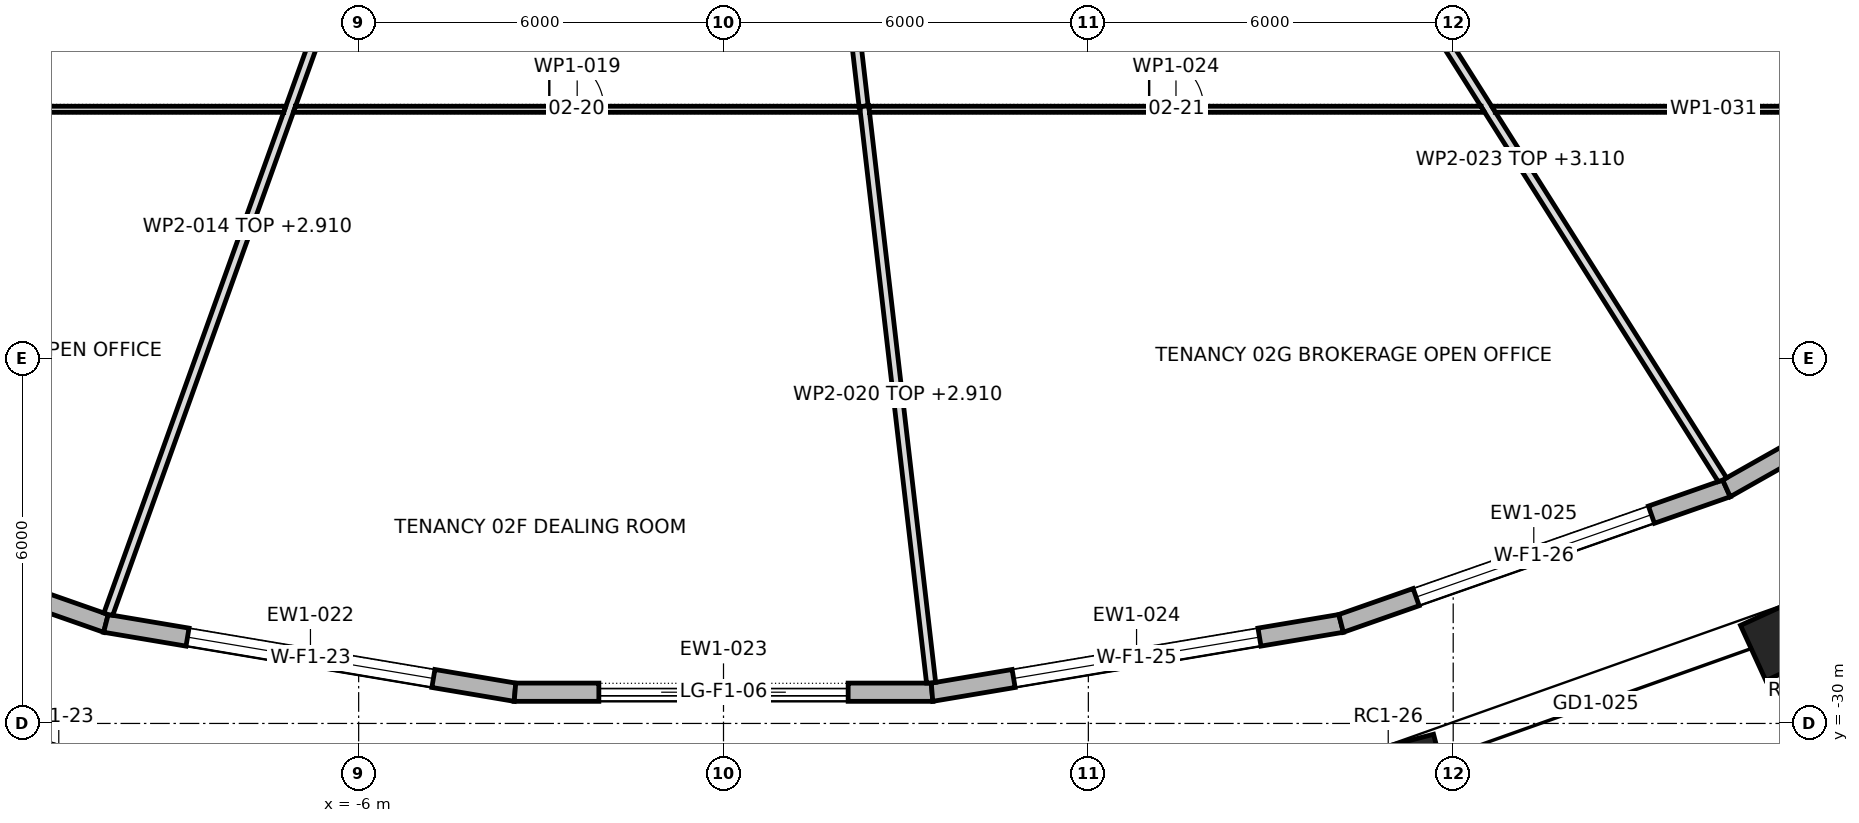
"""IFC4 building model, lengths in metres.
Left out: names, types, materials, properties, quantities, classifications, styles, units other than length and angle.
Written with IfcOpenShell. Run it as: python <this file> out.ifc"""

import sys

from ifc_helpers import new_model, si_unit, direction, frame, frame_2d, origin, origin_2d, place, context, subcontext, project, spatial, polyline, rectangle, outline, extrude, element, fill, save


model = new_model("IFC4")
c1 = context("Model", 3, precision=1e-05, world=origin(), true_north=direction((0.0, 1.0)))
c2 = subcontext(c1, "Body", "Model", "MODEL_VIEW")
j1 = project(units=[si_unit("LENGTHUNIT", "METRE"), si_unit("PLANEANGLEUNIT", "RADIAN")], contexts=[c1])
p1 = place(None, origin())
s1 = spatial("IfcSite", under=j1, at=p1, CompositionType="ELEMENT")
p2 = place(p1, origin())
s2 = spatial("IfcBuilding", under=s1, at=p2, CompositionType="ELEMENT")
p3 = place(p2, frame((0.0, 0.0, 36.1)))
s3 = spatial("IfcBuildingStorey", under=s2, at=p3, CompositionType="ELEMENT", Elevation=36.1)
for number, where, z_axis, x_axis in (
    (1, (-10.931, -30.888, 0.0), (0.0, 0.0, 1.0), (0.968, -0.252, 0.0)),
    (2, (10.931, -30.888, 0.0), (0.0, 0.0, 1.0), (0.968, 0.252, 0.0)),
    (3, (17.752, -28.467, 0.0), (0.0, 0.0, 1.0), (0.909, 0.417, 0.0)),
):
    element("IfcColumn", number, at=place(p3, frame(where, z_axis=z_axis, x_axis=x_axis)), inside=s3, PredefinedType="COLUMN", context=c2, shape_type="SweptSolid", body=[
        extrude(rectangle(XDim=1.8, YDim=1.0, at=origin_2d()), origin(), (0.0, 0.0, 1.0), 4.2),
    ])
p4 = place(p3, frame((-16.494, -26.135, 0.0), z_axis=(0.0, 0.0, 1.0), x_axis=(0.943778979427, -0.330577128657, 0.0)))
e4 = element("IfcWall", 4, at=p4, inside=s3, PredefinedType="STANDARD", context=c2, shape_type="SweptSolid", body=[
    extrude(outline(polyline([(-0.013, -0.15), (6.728, -0.15), (6.703, 0.15), (0.013, 0.15), (-0.013, -0.15)])), origin(), (0.0, 0.0, 1.0), 3.9),
])
p5 = place(p4, frame((1.308, 0.0, 0.6)))
e5 = element("IfcOpeningElement", 5, at=p5, cuts=e4, PredefinedType="OPENING", context=c2, shape_type="SweptSolid", body=[
    extrude(rectangle(XDim=4.1, YDim=2.85, at=frame_2d((2.05, 1.425))), frame((0.0, 0.162, 0.0), z_axis=(0.0, -1.0, 0.0), x_axis=(1.0, 0.0, 0.0)), (0.0, 0.0, 1.0), 0.324),
])
p6 = place(p3, frame((-10.156, -28.355, 0.0), z_axis=(0.0, 0.0, 1.0), x_axis=(0.986145179906, -0.165884550659, 0.0)))
e6 = element("IfcWall", 6, at=p6, inside=s3, PredefinedType="STANDARD", context=c2, shape_type="SweptSolid", body=[
    extrude(outline(polyline([(-0.013, -0.15), (6.834, -0.15), (6.809, 0.15), (0.013, 0.15), (-0.013, -0.15)])), origin(), (0.0, 0.0, 1.0), 3.9),
])
p7 = place(p6, frame((1.361, 0.0, 0.6)))
e7 = element("IfcOpeningElement", 7, at=p7, cuts=e6, PredefinedType="OPENING", context=c2, shape_type="SweptSolid", body=[
    extrude(rectangle(XDim=4.1, YDim=2.85, at=frame_2d((2.05, 1.425))), frame((0.0, 0.162, 0.0), z_axis=(0.0, -1.0, 0.0), x_axis=(1.0, 0.0, 0.0)), (0.0, 0.0, 1.0), 0.324),
])
p8 = place(p3, frame((-3.429, -29.486, 0.0), z_axis=(0.0, 0.0, 1.0), x_axis=(1.0, 0.0, 0.0)))
e8 = element("IfcWall", 8, at=p8, inside=s3, PredefinedType="STANDARD", context=c2, shape_type="SweptSolid", body=[
    extrude(outline(polyline([(-0.012, -0.15), (6.871, -0.15), (6.846, 0.15), (0.012, 0.15), (-0.012, -0.15)])), origin(), (0.0, 0.0, 1.0), 3.9),
])
p9 = place(p8, frame((1.379, 0.0, 0.0)))
e9 = element("IfcOpeningElement", 9, at=p9, cuts=e8, PredefinedType="OPENING", context=c2, shape_type="SweptSolid", body=[
    extrude(rectangle(XDim=4.1, YDim=3.45, at=frame_2d((2.05, 1.725))), frame((0.0, 0.162, 0.0), z_axis=(0.0, -1.0, 0.0), x_axis=(1.0, 0.0, 0.0)), (0.0, 0.0, 1.0), 0.324),
])
p10 = place(p3, frame((3.429, -29.486, 0.0), z_axis=(0.0, 0.0, 1.0), x_axis=(0.986145179906, 0.165884550659, 0.0)))
e10 = element("IfcWall", 10, at=p10, inside=s3, PredefinedType="STANDARD", context=c2, shape_type="SweptSolid", body=[
    extrude(outline(polyline([(-0.012, -0.15), (6.834, -0.15), (6.809, 0.15), (0.012, 0.15), (-0.012, -0.15)])), origin(), (0.0, 0.0, 1.0), 3.9),
])
p11 = place(p10, frame((1.361, 0.0, 0.6)))
e11 = element("IfcOpeningElement", 11, at=p11, cuts=e10, PredefinedType="OPENING", context=c2, shape_type="SweptSolid", body=[
    extrude(rectangle(XDim=4.1, YDim=2.85, at=frame_2d((2.05, 1.425))), frame((0.0, 0.162, 0.0), z_axis=(0.0, -1.0, 0.0), x_axis=(1.0, 0.0, 0.0)), (0.0, 0.0, 1.0), 0.324),
])
p12 = place(p3, frame((10.156, -28.355, 0.0), z_axis=(0.0, 0.0, 1.0), x_axis=(0.943778979427, 0.330577128657, 0.0)))
e12 = element("IfcWall", 12, at=p12, inside=s3, PredefinedType="STANDARD", context=c2, shape_type="SweptSolid", body=[
    extrude(outline(polyline([(-0.013, -0.15), (6.729, -0.15), (6.702, 0.15), (0.013, 0.15), (-0.013, -0.15)])), origin(), (0.0, 0.0, 1.0), 3.9),
])
p13 = place(p12, frame((1.308, 0.0, 0.6)))
e13 = element("IfcOpeningElement", 13, at=p13, cuts=e12, PredefinedType="OPENING", context=c2, shape_type="SweptSolid", body=[
    extrude(rectangle(XDim=4.1, YDim=2.85, at=frame_2d((2.05, 1.425))), frame((0.0, 0.162, 0.0), z_axis=(0.0, -1.0, 0.0), x_axis=(1.0, 0.0, 0.0)), (0.0, 0.0, 1.0), 0.324),
])
p14 = place(p3, frame((16.494, -26.135, 0.0), z_axis=(0.0, 0.0, 1.0), x_axis=(0.87061279013, 0.491968870623, 0.0)))
e14 = element("IfcWall", 14, at=p14, inside=s3, PredefinedType="STANDARD", context=c2, shape_type="SweptSolid", body=[
    extrude(outline(polyline([(-0.013, -0.15), (6.568, -0.15), (6.539, 0.15), (0.013, 0.15), (-0.013, -0.15)])), origin(), (0.0, 0.0, 1.0), 3.9),
])
p15 = place(p14, frame((1.227, 0.0, 0.6)))
e15 = element("IfcOpeningElement", 15, at=p15, cuts=e14, PredefinedType="OPENING", context=c2, shape_type="SweptSolid", body=[
    extrude(rectangle(XDim=4.1, YDim=2.85, at=frame_2d((2.05, 1.425))), frame((0.0, 0.162, 0.0), z_axis=(0.0, -1.0, 0.0), x_axis=(1.0, 0.0, 0.0)), (0.0, 0.0, 1.0), 0.324),
])
p16 = place(p3, frame((-10.119, -28.209, 0.0), z_axis=(0.0, 0.0, 1.0), x_axis=(0.337949016046, 0.941164418448, 0.0)))
e16 = element("IfcWall", 16, at=p16, inside=s3, PredefinedType="PARTITIONING", context=c2, shape_type="SweptSolid", body=[
    extrude(outline(polyline([(0.014, -0.075), (1.792, -0.075), (3.57, -0.075), (5.347, -0.075), (7.125, -0.075), (8.903, -0.075), (8.908, -0.073), (8.909, -0.075), (10.458, -0.075), (12.008, -0.075), (13.557, -0.075), (13.557, -0.074), (13.555, -0.069), (13.555, -0.069), (13.503, 0.075), (11.919, 0.075), (10.335, 0.075), (8.751, 0.075), (8.749, 0.074), (8.749, 0.075), (6.999, 0.075), (5.249, 0.075), (3.5, 0.075), (1.75, 0.075), (0.0, 0.075), (0.0, 0.071), (0.0, -0.0), (0.014, -0.075)])), origin(), (0.0, 0.0, 1.0), 2.91),
])
p17 = place(p3, frame((-7.198, -19.9, 0.0), z_axis=(0.0, 0.0, 1.0), x_axis=(-1.0, 0.0, 0.0)))
e17 = element("IfcWall", 17, at=p17, inside=s3, PredefinedType="PARTITIONING", context=c2, shape_type="SweptSolid", body=[
    extrude(outline(polyline([(0.0, -0.05), (1.993, -0.05), (3.986, -0.05), (5.979, -0.05), (7.972, -0.05), (9.965, -0.05), (11.958, -0.05), (12.055, 0.05), (12.055, 0.05), (10.338, 0.05), (8.621, 0.05), (6.904, 0.05), (5.187, 0.05), (3.47, 0.05), (1.753, 0.05), (0.035, 0.05), (0.0, -0.049), (0.0, -0.05)])), origin(), (0.0, 0.0, 1.0), 3.9),
])
p18 = place(p17, frame((5.577, 0.0, 0.0)))
e18 = element("IfcOpeningElement", 18, at=p18, cuts=e17, PredefinedType="OPENING", context=c2, shape_type="SweptSolid", body=[
    extrude(rectangle(XDim=0.9, YDim=2.1, at=frame_2d((0.45, 1.05))), frame((0.0, 0.062, 0.0), z_axis=(0.0, -1.0, 0.0), x_axis=(1.0, 0.0, 0.0)), (0.0, 0.0, 1.0), 0.124),
])
p19 = place(p3, frame((1.798, -15.467, 0.0), z_axis=(0.0, 0.0, 1.0), x_axis=(0.114783679138, -0.993390510828, 0.0)))
e19 = element("IfcWall", 19, at=p19, inside=s3, PredefinedType="PARTITIONING", context=c2, shape_type="SweptSolid", body=[
    extrude(outline(polyline([(0.0, -0.075), (1.468, -0.075), (2.936, -0.075), (4.404, -0.075), (4.404, -0.075), (4.407, -0.075), (4.413, -0.075), (4.413, 0.075), (2.948, 0.075), (1.483, 0.075), (0.017, 0.075), (0.0, -0.073), (0.0, -0.075)])), origin(), (0.0, 0.0, 1.0), 2.91),
])
p20 = place(p3, frame((2.25, -19.9, 0.0), z_axis=(0.0, 0.0, 1.0), x_axis=(-1.0, 0.0, 0.0)))
e20 = element("IfcWall", 20, at=p20, inside=s3, PredefinedType="PARTITIONING", context=c2, shape_type="SweptSolid", body=[
    extrude(outline(polyline([(0.021, -0.05), (1.875, -0.05), (3.728, -0.05), (5.581, -0.05), (7.435, -0.05), (9.288, -0.05), (9.324, 0.05), (9.324, 0.05), (7.459, 0.05), (5.594, 0.05), (3.729, 0.05), (1.865, 0.05), (0.0, 0.05), (0.0, 0.047), (0.01, -0.041), (0.0, -0.042), (0.0, -0.043), (0.02, -0.041), (0.021, -0.05)])), origin(), (0.0, 0.0, 1.0), 3.9),
])
p21 = place(p20, frame((4.215, 0.0, 0.0)))
e21 = element("IfcOpeningElement", 21, at=p21, cuts=e20, PredefinedType="OPENING", context=c2, shape_type="SweptSolid", body=[
    extrude(rectangle(XDim=0.9, YDim=2.1, at=frame_2d((0.45, 1.05))), frame((0.0, 0.062, 0.0), z_axis=(0.0, -1.0, 0.0), x_axis=(1.0, 0.0, 0.0)), (0.0, 0.0, 1.0), 0.124),
])
p22 = place(p3, frame((2.314, -19.85, 0.0), z_axis=(0.0, 0.0, 1.0), x_axis=(0.115247328534, -0.9933368277, 0.0)))
e22 = element("IfcWall", 22, at=p22, inside=s3, PredefinedType="PARTITIONING", context=c2, shape_type="SweptSolid", body=[
    extrude(outline(polyline([(0.089, -0.075), (1.979, -0.075), (3.87, -0.075), (5.76, -0.075), (7.65, -0.075), (9.541, -0.075), (9.546, -0.034), (9.546, 0.075), (7.658, 0.075), (5.771, 0.075), (3.884, 0.075), (1.996, 0.075), (0.109, 0.075), (0.109, 0.074), (0.098, 0.075), (0.0, 0.075), (0.0, -0.065), (0.089, -0.075)])), origin(), (0.0, 0.0, 1.0), 2.91),
])
p23 = place(p3, frame((9.752, -15.435, 0.0), z_axis=(0.0, 0.0, 1.0), x_axis=(0.534413972524, -0.845222873549, 0.0)))
e23 = element("IfcWall", 23, at=p23, inside=s3, PredefinedType="PARTITIONING", context=c2, shape_type="SweptSolid", body=[
    extrude(outline(polyline([(0.0, -0.075), (1.725, -0.075), (3.451, -0.075), (5.176, -0.075), (5.177, -0.073), (5.181, -0.075), (7.005, -0.075), (8.83, -0.075), (10.655, -0.075), (12.48, -0.075), (12.497, 0.001), (12.5, 0.064), (12.5, 0.075), (10.723, 0.075), (8.945, 0.075), (7.167, 0.075), (5.389, 0.075), (5.387, 0.072), (5.383, 0.075), (3.62, 0.075), (1.858, 0.075), (0.095, 0.075), (0.0, -0.075), (0.0, -0.075)])), origin(), (0.0, 0.0, 1.0), 3.11),
])
p24 = place(p3, frame((12.518, -19.9, 0.0), z_axis=(0.0, 0.0, 1.0), x_axis=(-1.0, 0.0, 0.0)))
e24 = element("IfcWall", 24, at=p24, inside=s3, PredefinedType="PARTITIONING", context=c2, shape_type="SweptSolid", body=[
    extrude(outline(polyline([(10.128, -0.05), (10.128, -0.048), (10.117, 0.05), (8.431, 0.05), (6.745, 0.05), (5.058, 0.05), (3.372, 0.05), (1.686, 0.05), (0.0, 0.05), (0.0, 0.05), (0.063, -0.05), (1.741, -0.05), (3.418, -0.05), (5.096, -0.05), (6.773, -0.05), (8.451, -0.05), (10.128, -0.05)])), origin(), (0.0, 0.0, 1.0), 3.9),
])
p25 = place(p24, frame((4.618, 0.0, 0.0)))
e25 = element("IfcOpeningElement", 25, at=p25, cuts=e24, PredefinedType="OPENING", context=c2, shape_type="SweptSolid", body=[
    extrude(rectangle(XDim=0.9, YDim=2.1, at=frame_2d((0.45, 1.05))), frame((0.0, 0.062, 0.0), z_axis=(0.0, -1.0, 0.0), x_axis=(1.0, 0.0, 0.0)), (0.0, 0.0, 1.0), 0.124),
])
p26 = place(p3, frame((19.95, -19.9, 0.0), z_axis=(0.0, 0.0, 1.0), x_axis=(-1.0, 0.0, 0.0)))
e26 = element("IfcWall", 26, at=p26, inside=s3, PredefinedType="PARTITIONING", context=c2, shape_type="SweptSolid", body=[
    extrude(outline(polyline([(7.317, -0.05), (7.317, -0.05), (7.254, 0.05), (5.441, 0.05), (3.627, 0.05), (1.813, 0.05), (0.0, 0.05), (0.1, -0.05), (0.1, -0.05), (1.904, -0.05), (3.709, -0.05), (5.513, -0.05), (7.317, -0.05)])), origin(), (0.0, 0.0, 1.0), 3.9),
])
p27 = place(p7, origin())
e27 = element("IfcWindow", 27, at=p27, inside=s3, PartitioningType="TRIPLE_PANEL_VERTICAL", PredefinedType="WINDOW", context=c2, shape_type="SweptSolid", body=[
    extrude(rectangle(XDim=4.1, YDim=2.85, at=frame_2d((2.05, 1.425))), frame((0.0, 0.03, 0.0), z_axis=(0.0, -1.0, 0.0), x_axis=(1.0, 0.0, 0.0)), (0.0, 0.0, 1.0), 0.06),
])
fill(e7, e27)
p28 = place(p9, origin())
e28 = element("IfcDoor", 28, at=p28, inside=s3, OperationType="DOUBLE_DOOR_SLIDING", PredefinedType="DOOR", context=c2, shape_type="SweptSolid", body=[
    extrude(rectangle(XDim=4.1, YDim=3.45, at=frame_2d((2.05, 1.725))), frame((0.0, 0.025, 0.0), z_axis=(0.0, -1.0, 0.0), x_axis=(1.0, 0.0, 0.0)), (0.0, 0.0, 1.0), 0.05),
])
fill(e9, e28)
p29 = place(p11, origin())
e29 = element("IfcWindow", 29, at=p29, inside=s3, PartitioningType="TRIPLE_PANEL_VERTICAL", PredefinedType="WINDOW", context=c2, shape_type="SweptSolid", body=[
    extrude(rectangle(XDim=4.1, YDim=2.85, at=frame_2d((2.05, 1.425))), frame((0.0, 0.03, 0.0), z_axis=(0.0, -1.0, 0.0), x_axis=(1.0, 0.0, 0.0)), (0.0, 0.0, 1.0), 0.06),
])
fill(e11, e29)
p30 = place(p13, origin())
e30 = element("IfcWindow", 30, at=p30, inside=s3, PartitioningType="TRIPLE_PANEL_VERTICAL", PredefinedType="WINDOW", context=c2, shape_type="SweptSolid", body=[
    extrude(rectangle(XDim=4.1, YDim=2.85, at=frame_2d((2.05, 1.425))), frame((0.0, 0.03, 0.0), z_axis=(0.0, -1.0, 0.0), x_axis=(1.0, 0.0, 0.0)), (0.0, 0.0, 1.0), 0.06),
])
fill(e13, e30)
p31 = place(p21, frame((0.9, 0.0, 0.0), z_axis=(0.0, 0.0, 1.0), x_axis=(-1.0, 0.0, 0.0)))
e31 = element("IfcDoor", 31, at=p31, inside=s3, OperationType="SINGLE_SWING_RIGHT", PredefinedType="DOOR", context=c2, shape_type="SweptSolid", body=[
    extrude(rectangle(XDim=0.9, YDim=2.1, at=frame_2d((0.45, 1.05))), frame((0.0, 0.025, 0.0), z_axis=(0.0, -1.0, 0.0), x_axis=(1.0, 0.0, 0.0)), (0.0, 0.0, 1.0), 0.05),
])
fill(e21, e31)
p32 = place(p25, frame((0.9, 0.0, 0.0), z_axis=(0.0, 0.0, 1.0), x_axis=(-1.0, 0.0, 0.0)))
e32 = element("IfcDoor", 32, at=p32, inside=s3, OperationType="SINGLE_SWING_RIGHT", PredefinedType="DOOR", context=c2, shape_type="SweptSolid", body=[
    extrude(rectangle(XDim=0.9, YDim=2.1, at=frame_2d((0.45, 1.05))), frame((0.0, 0.025, 0.0), z_axis=(0.0, -1.0, 0.0), x_axis=(1.0, 0.0, 0.0)), (0.0, 0.0, 1.0), 0.05),
])
fill(e25, e32)
save(model, sys.argv[1])
